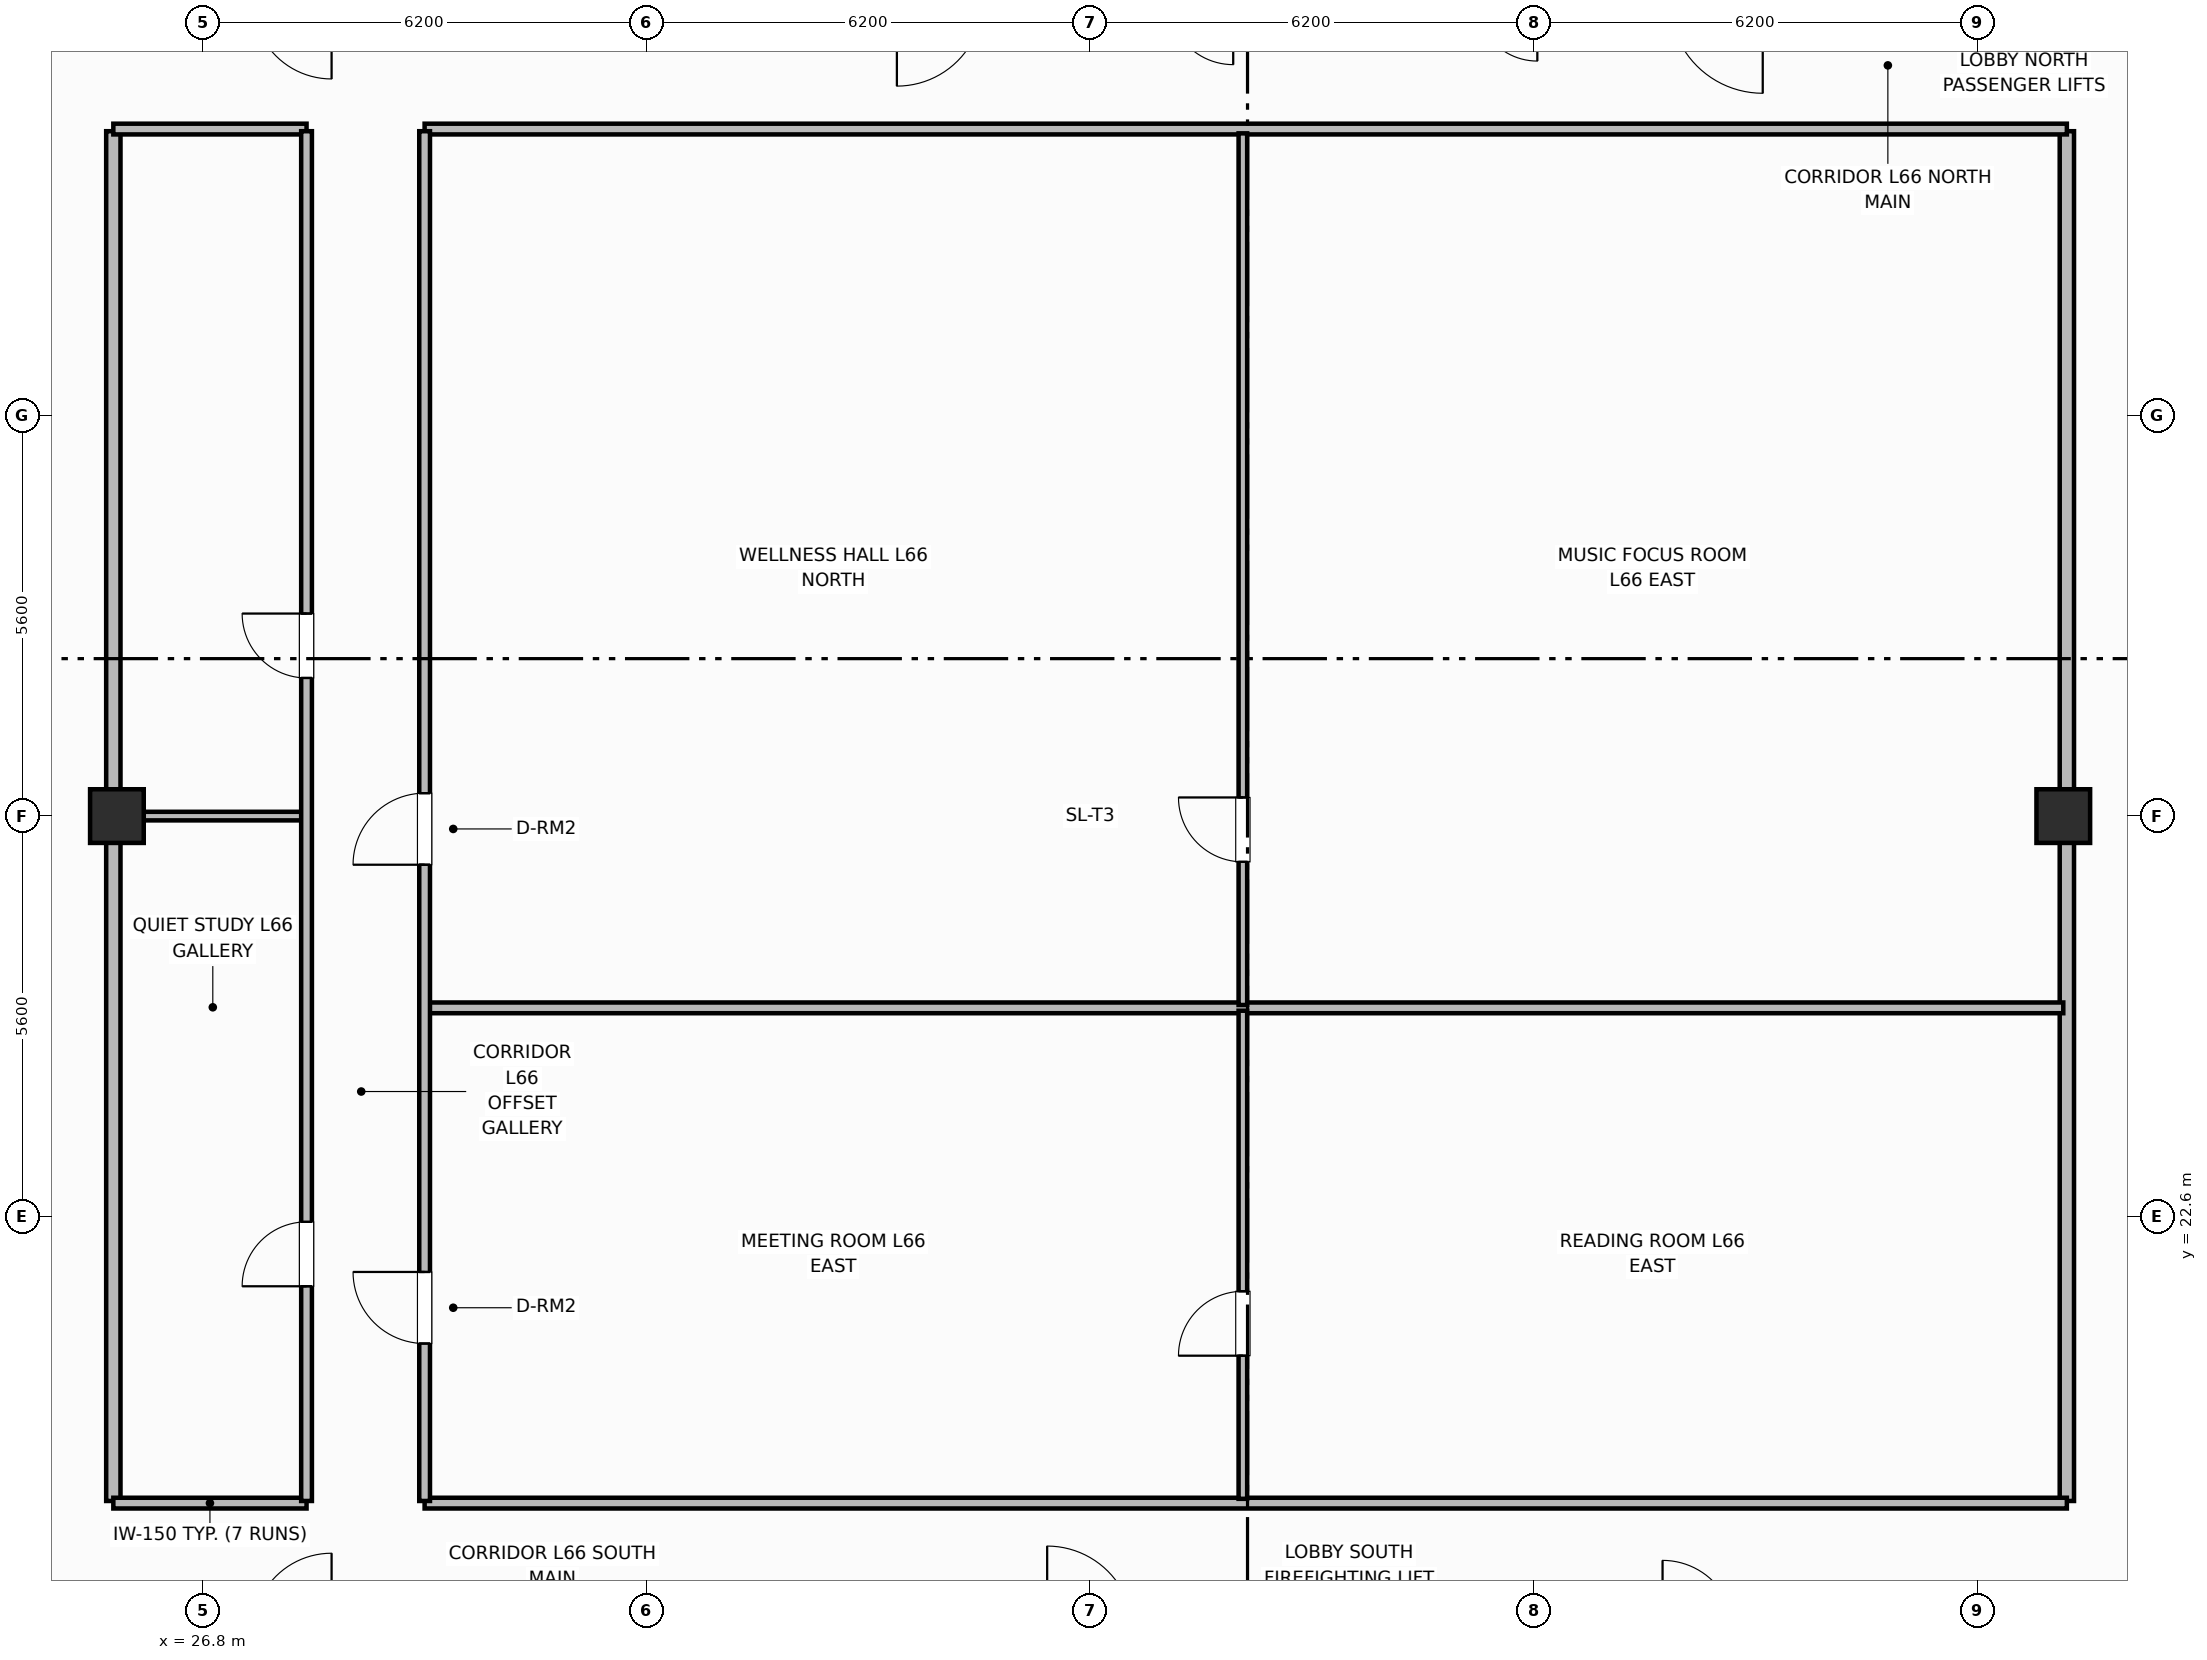
"""IFC4 building model, lengths in metres.
Left out: names, types, materials, properties, quantities, classifications, styles, units other than length and angle.
Written with IfcOpenShell. Run it as: python <this file> out.ifc"""

import sys

from ifc_helpers import new_model, si_unit, direction, frame, frame_2d, origin, origin_2d, place, context, subcontext, project, spatial, rectangle, extrude, element, fill, save


model = new_model("IFC4")
c1 = context("Model", 3, precision=1e-05, world=origin(), true_north=direction((0.0, 1.0)))
c2 = subcontext(c1, "Body", "Model", "MODEL_VIEW")
j1 = project(units=[si_unit("LENGTHUNIT", "METRE"), si_unit("PLANEANGLEUNIT", "RADIAN")], contexts=[c1])
p1 = place(None, origin())
s1 = spatial("IfcSite", under=j1, at=p1, CompositionType="ELEMENT")
p2 = place(p1, origin())
s2 = spatial("IfcBuilding", under=s1, at=p2, CompositionType="ELEMENT")
p3 = place(p2, frame((0.0, 0.0, 263.9)))
s3 = spatial("IfcBuildingStorey", under=s2, at=p3, CompositionType="ELEMENT", Elevation=263.9)
for number, where, z_axis, x_axis in (
    (1, (25.6, 28.2, 0.0), (0.0, 0.0, 1.0), (1.0, 0.0, 0.0)),
    (2, (52.8, 28.2, 0.0), (0.0, 0.0, 1.0), (1.0, 0.0, 0.0)),
):
    element("IfcColumn", number, at=place(p3, frame(where, z_axis=z_axis, x_axis=x_axis)), inside=s3, PredefinedType="COLUMN", context=c2, shape_type="SweptSolid", body=[
        extrude(rectangle(XDim=0.75, YDim=0.75, at=origin_2d()), origin(), (0.0, 0.0, 1.0), 3.7),
    ])
for number, where, z_axis, x_axis in (
    (3, (25.55, 18.63, 0.0), (0.0, 0.0, 1.0), (0.0, 1.0, 0.0)),
    (4, (52.85, 18.63, 0.0), (0.0, 0.0, 1.0), (0.0, 1.0, 0.0)),
):
    element("IfcWall", number, at=place(p3, frame(where, z_axis=z_axis, x_axis=x_axis)), inside=s3, PredefinedType="PARTITIONING", context=c2, shape_type="SweptSolid", body=[
        extrude(rectangle(XDim=19.14, YDim=0.2, at=frame_2d((9.57, 0.0))), origin(), (0.0, 0.0, 1.0), 2.56),
    ])
p4 = place(p3, frame((25.55, 18.6, 0.0), z_axis=(0.0, 0.0, 1.0), x_axis=(1.0, 0.0, 0.0)))
e5 = element("IfcWall", 5, at=p4, inside=s3, PredefinedType="PARTITIONING", context=c2, shape_type="SweptSolid", body=[
    extrude(rectangle(XDim=2.7, YDim=0.15, at=frame_2d((1.35, 0.0))), origin(), (0.0, 0.0, 1.0), 2.56),
])
p5 = place(p3, frame((29.9, 18.6, 0.0), z_axis=(0.0, 0.0, 1.0), x_axis=(1.0, 0.0, 0.0)))
e6 = element("IfcWall", 6, at=p5, inside=s3, PredefinedType="PARTITIONING", context=c2, shape_type="SweptSolid", body=[
    extrude(rectangle(XDim=22.95, YDim=0.15, at=frame_2d((11.475, 0.0))), origin(), (0.0, 0.0, 1.0), 2.56),
])
p6 = place(p3, frame((25.55, 37.8, 0.0), z_axis=(0.0, 0.0, 1.0), x_axis=(1.0, 0.0, 0.0)))
e7 = element("IfcWall", 7, at=p6, inside=s3, PredefinedType="PARTITIONING", context=c2, shape_type="SweptSolid", body=[
    extrude(rectangle(XDim=2.7, YDim=0.15, at=frame_2d((1.35, 0.0))), origin(), (0.0, 0.0, 1.0), 2.56),
])
p7 = place(p3, frame((29.9, 37.8, 0.0), z_axis=(0.0, 0.0, 1.0), x_axis=(1.0, 0.0, 0.0)))
e8 = element("IfcWall", 8, at=p7, inside=s3, PredefinedType="PARTITIONING", context=c2, shape_type="SweptSolid", body=[
    extrude(rectangle(XDim=22.95, YDim=0.15, at=frame_2d((11.475, 0.0))), origin(), (0.0, 0.0, 1.0), 2.56),
])
p8 = place(p3, frame((25.6, 28.2, 0.0), z_axis=(0.0, 0.0, 1.0), x_axis=(1.0, 0.0, 0.0)))
e9 = element("IfcWall", 9, at=p8, inside=s3, PredefinedType="PARTITIONING", context=c2, shape_type="SweptSolid", body=[
    extrude(rectangle(XDim=2.66, YDim=0.12, at=frame_2d((1.33, 0.0))), origin(), (0.0, 0.0, 1.0), 2.56),
])
p9 = place(p3, frame((29.93, 25.521, 0.0), z_axis=(0.0, 0.0, 1.0), x_axis=(1.0, 0.0, 0.0)))
e10 = element("IfcWall", 10, at=p9, inside=s3, PredefinedType="PARTITIONING", context=c2, shape_type="SweptSolid", body=[
    extrude(rectangle(XDim=22.87, YDim=0.15, at=frame_2d((11.435, 0.0))), origin(), (0.0, 0.0, 1.0), 2.56),
])
p10 = place(p3, frame((41.335, 18.66, 0.0), z_axis=(0.0, 0.0, 1.0), x_axis=(0.0, 1.0, 0.0)))
e11 = element("IfcWall", 11, at=p10, inside=s3, PredefinedType="PARTITIONING", context=c2, shape_type="SweptSolid", body=[
    extrude(rectangle(XDim=6.821, YDim=0.12, at=frame_2d((3.41, 0.0))), origin(), (0.0, 0.0, 1.0), 2.56),
])
p11 = place(p10, frame((2.0, 0.0, 0.0)))
e12 = element("IfcOpeningElement", 12, at=p11, cuts=e11, PredefinedType="OPENING", context=c2, shape_type="SweptSolid", body=[
    extrude(rectangle(XDim=0.9, YDim=2.1, at=frame_2d((0.45, 1.05))), frame((0.0, 0.07, 0.0), z_axis=(0.0, -1.0, 0.0), x_axis=(1.0, 0.0, 0.0)), (0.0, 0.0, 1.0), 0.14),
])
p12 = place(p3, frame((41.335, 25.56, 0.0), z_axis=(0.0, 0.0, 1.0), x_axis=(0.0, 1.0, 0.0)))
e13 = element("IfcWall", 13, at=p12, inside=s3, PredefinedType="PARTITIONING", context=c2, shape_type="SweptSolid", body=[
    extrude(rectangle(XDim=12.18, YDim=0.12, at=frame_2d((6.09, 0.0))), origin(), (0.0, 0.0, 1.0), 2.56),
])
p13 = place(p12, frame((2.0, 0.0, 0.0)))
e14 = element("IfcOpeningElement", 14, at=p13, cuts=e13, PredefinedType="OPENING", context=c2, shape_type="SweptSolid", body=[
    extrude(rectangle(XDim=0.9, YDim=2.1, at=frame_2d((0.45, 1.05))), frame((0.0, 0.07, 0.0), z_axis=(0.0, -1.0, 0.0), x_axis=(1.0, 0.0, 0.0)), (0.0, 0.0, 1.0), 0.14),
])
p14 = place(p3, frame((28.25, 18.63, 0.0), z_axis=(0.0, 0.0, 1.0), x_axis=(0.0, 1.0, 0.0)))
e15 = element("IfcWall", 15, at=p14, inside=s3, PredefinedType="PARTITIONING", context=c2, shape_type="SweptSolid", body=[
    extrude(rectangle(XDim=19.14, YDim=0.15, at=frame_2d((9.57, 0.0))), origin(), (0.0, 0.0, 1.0), 2.56),
])
p15 = place(p14, frame((3.0, 0.0, 0.0)))
e16 = element("IfcOpeningElement", 16, at=p15, cuts=e15, PredefinedType="OPENING", context=c2, shape_type="SweptSolid", body=[
    extrude(rectangle(XDim=0.9, YDim=2.1, at=frame_2d((0.45, 1.05))), frame((0.0, 0.085, 0.0), z_axis=(0.0, -1.0, 0.0), x_axis=(1.0, 0.0, 0.0)), (0.0, 0.0, 1.0), 0.17),
])
p16 = place(p14, frame((11.5, 0.0, 0.0)))
e17 = element("IfcOpeningElement", 17, at=p16, cuts=e15, PredefinedType="OPENING", context=c2, shape_type="SweptSolid", body=[
    extrude(rectangle(XDim=0.9, YDim=2.1, at=frame_2d((0.45, 1.05))), frame((0.0, 0.085, 0.0), z_axis=(0.0, -1.0, 0.0), x_axis=(1.0, 0.0, 0.0)), (0.0, 0.0, 1.0), 0.17),
])
p17 = place(p3, frame((29.9, 18.63, 0.0), z_axis=(0.0, 0.0, 1.0), x_axis=(0.0, 1.0, 0.0)))
e18 = element("IfcWall", 18, at=p17, inside=s3, PredefinedType="PARTITIONING", context=c2, shape_type="SweptSolid", body=[
    extrude(rectangle(XDim=19.14, YDim=0.15, at=frame_2d((9.57, 0.0))), origin(), (0.0, 0.0, 1.0), 2.56),
])
p18 = place(p17, frame((2.2, 0.0, 0.0)))
e19 = element("IfcOpeningElement", 19, at=p18, cuts=e18, PredefinedType="OPENING", context=c2, shape_type="SweptSolid", body=[
    extrude(rectangle(XDim=1.0, YDim=2.15, at=frame_2d((0.5, 1.075))), frame((0.0, 0.085, 0.0), z_axis=(0.0, -1.0, 0.0), x_axis=(1.0, 0.0, 0.0)), (0.0, 0.0, 1.0), 0.17),
])
p19 = place(p17, frame((8.89, 0.0, 0.0)))
e20 = element("IfcOpeningElement", 20, at=p19, cuts=e18, PredefinedType="OPENING", context=c2, shape_type="SweptSolid", body=[
    extrude(rectangle(XDim=1.0, YDim=2.15, at=frame_2d((0.5, 1.075))), frame((0.0, 0.085, 0.0), z_axis=(0.0, -1.0, 0.0), x_axis=(1.0, 0.0, 0.0)), (0.0, 0.0, 1.0), 0.17),
])
p20 = place(p11, origin())
e21 = element("IfcDoor", 21, at=p20, inside=s3, OperationType="SINGLE_SWING_LEFT", PredefinedType="DOOR", context=c2, shape_type="SweptSolid", body=[
    extrude(rectangle(XDim=0.9, YDim=2.1, at=frame_2d((0.45, 1.05))), frame((0.0, 0.025, 0.0), z_axis=(0.0, -1.0, 0.0), x_axis=(1.0, 0.0, 0.0)), (0.0, 0.0, 1.0), 0.05),
])
fill(e12, e21)
p21 = place(p13, origin())
e22 = element("IfcDoor", 22, at=p21, inside=s3, OperationType="SINGLE_SWING_RIGHT", PredefinedType="DOOR", context=c2, shape_type="SweptSolid", body=[
    extrude(rectangle(XDim=0.9, YDim=2.1, at=frame_2d((0.45, 1.05))), frame((0.0, 0.025, 0.0), z_axis=(0.0, -1.0, 0.0), x_axis=(1.0, 0.0, 0.0)), (0.0, 0.0, 1.0), 0.05),
])
fill(e14, e22)
p22 = place(p15, origin())
e23 = element("IfcDoor", 23, at=p22, inside=s3, OperationType="SINGLE_SWING_LEFT", PredefinedType="DOOR", context=c2, shape_type="SweptSolid", body=[
    extrude(rectangle(XDim=0.9, YDim=2.1, at=frame_2d((0.45, 1.05))), frame((0.0, 0.025, 0.0), z_axis=(0.0, -1.0, 0.0), x_axis=(1.0, 0.0, 0.0)), (0.0, 0.0, 1.0), 0.05),
])
fill(e16, e23)
p23 = place(p16, origin())
e24 = element("IfcDoor", 24, at=p23, inside=s3, OperationType="SINGLE_SWING_RIGHT", PredefinedType="DOOR", context=c2, shape_type="SweptSolid", body=[
    extrude(rectangle(XDim=0.9, YDim=2.1, at=frame_2d((0.45, 1.05))), frame((0.0, 0.025, 0.0), z_axis=(0.0, -1.0, 0.0), x_axis=(1.0, 0.0, 0.0)), (0.0, 0.0, 1.0), 0.05),
])
fill(e17, e24)
p24 = place(p18, origin())
e25 = element("IfcDoor", 25, at=p24, inside=s3, OperationType="SINGLE_SWING_RIGHT", PredefinedType="DOOR", context=c2, shape_type="SweptSolid", body=[
    extrude(rectangle(XDim=1.0, YDim=2.15, at=frame_2d((0.5, 1.075))), frame((0.0, 0.025, 0.0), z_axis=(0.0, -1.0, 0.0), x_axis=(1.0, 0.0, 0.0)), (0.0, 0.0, 1.0), 0.05),
])
fill(e19, e25)
p25 = place(p19, origin())
e26 = element("IfcDoor", 26, at=p25, inside=s3, OperationType="SINGLE_SWING_LEFT", PredefinedType="DOOR", context=c2, shape_type="SweptSolid", body=[
    extrude(rectangle(XDim=1.0, YDim=2.15, at=frame_2d((0.5, 1.075))), frame((0.0, 0.025, 0.0), z_axis=(0.0, -1.0, 0.0), x_axis=(1.0, 0.0, 0.0)), (0.0, 0.0, 1.0), 0.05),
])
fill(e20, e26)
save(model, sys.argv[1])
